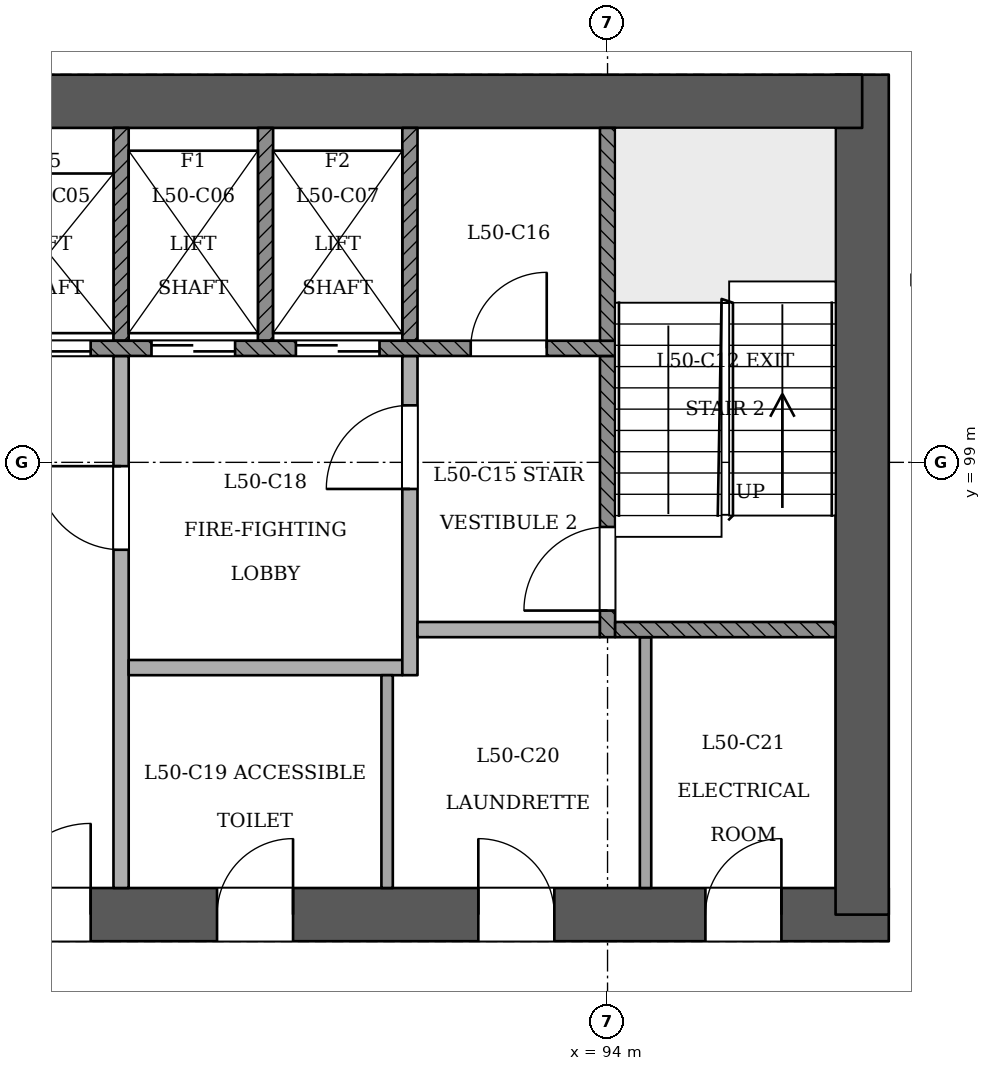
"""IFC4 building model, lengths in metres.
Left out: names, types, materials, properties, quantities, classifications, styles, units other than length and angle.
Written with IfcOpenShell. Run it as: python <this file> out.ifc"""

import sys

from ifc_helpers import new_model, si_unit, direction, frame, frame_2d, origin, place, context, subcontext, project, spatial, rectangle, extrude, element, fill, save


model = new_model("IFC4")
c1 = context("Model", 3, precision=1e-05, world=origin(), true_north=direction((0.0, 1.0)))
c2 = subcontext(c1, "Body", "Model", "MODEL_VIEW")
j1 = project(units=[si_unit("LENGTHUNIT", "METRE"), si_unit("PLANEANGLEUNIT", "RADIAN")], contexts=[c1])
p1 = place(None, origin())
s1 = spatial("IfcSite", under=j1, at=p1, CompositionType="ELEMENT")
p2 = place(p1, origin())
s2 = spatial("IfcBuilding", under=s1, at=p2, CompositionType="ELEMENT")
p3 = place(p2, frame((0.0, 0.0, 194.4)))
s3 = spatial("IfcBuildingStorey", under=s2, at=p3, CompositionType="ELEMENT", Elevation=194.4)
p4 = place(p3, frame((72.65, 93.05, 0.0), z_axis=(0.0, 0.0, 1.0), x_axis=(1.0, 0.0, 0.0)))
e1 = element("IfcWall", 1, at=p4, inside=s3, PredefinedType="SHEAR", context=c2, shape_type="SweptSolid", body=[
    extrude(rectangle(XDim=25.05, YDim=0.7, at=frame_2d((12.525, 0.0))), origin(), (0.0, 0.0, 1.0), 3.6),
])
p5 = place(p4, frame((1.15, 0.0, 0.0)))
e2 = element("IfcOpeningElement", 2, at=p5, cuts=e1, PredefinedType="OPENING", context=c2, shape_type="SweptSolid", body=[
    extrude(rectangle(XDim=1.2, YDim=2.1, at=frame_2d((0.6, 1.05))), frame((0.0, 0.36, 0.0), z_axis=(0.0, -1.0, 0.0), x_axis=(1.0, 0.0, 0.0)), (0.0, 0.0, 1.0), 0.721),
])
p6 = place(p4, frame((3.35, 0.0, 0.0)))
e3 = element("IfcOpeningElement", 3, at=p6, cuts=e1, PredefinedType="OPENING", context=c2, shape_type="SweptSolid", body=[
    extrude(rectangle(XDim=1.2, YDim=2.1, at=frame_2d((0.6, 1.05))), frame((0.0, 0.36, 0.0), z_axis=(0.0, -1.0, 0.0), x_axis=(1.0, 0.0, 0.0)), (0.0, 0.0, 1.0), 0.721),
])
p7 = place(p4, frame((13.35, 0.0, 0.0)))
e4 = element("IfcOpeningElement", 4, at=p7, cuts=e1, PredefinedType="OPENING", context=c2, shape_type="SweptSolid", body=[
    extrude(rectangle(XDim=1.2, YDim=2.1, at=frame_2d((0.6, 1.05))), frame((0.0, 0.36, 0.0), z_axis=(0.0, -1.0, 0.0), x_axis=(1.0, 0.0, 0.0)), (0.0, 0.0, 1.0), 0.721),
])
p8 = place(p4, frame((16.212, 0.0, 0.0)))
e5 = element("IfcOpeningElement", 5, at=p8, cuts=e1, PredefinedType="OPENING", context=c2, shape_type="SweptSolid", body=[
    extrude(rectangle(XDim=1.0, YDim=2.1, at=frame_2d((0.5, 1.05))), frame((0.0, 0.36, 0.0), z_axis=(0.0, -1.0, 0.0), x_axis=(1.0, 0.0, 0.0)), (0.0, 0.0, 1.0), 0.721),
])
p9 = place(p4, frame((19.65, 0.0, 0.0)))
e6 = element("IfcOpeningElement", 6, at=p9, cuts=e1, PredefinedType="OPENING", context=c2, shape_type="SweptSolid", body=[
    extrude(rectangle(XDim=1.0, YDim=2.1, at=frame_2d((0.5, 1.05))), frame((0.0, 0.36, 0.0), z_axis=(0.0, -1.0, 0.0), x_axis=(1.0, 0.0, 0.0)), (0.0, 0.0, 1.0), 0.721),
])
p10 = place(p4, frame((22.637, 0.0, 0.0)))
e7 = element("IfcOpeningElement", 7, at=p10, cuts=e1, PredefinedType="OPENING", context=c2, shape_type="SweptSolid", body=[
    extrude(rectangle(XDim=1.0, YDim=2.1, at=frame_2d((0.5, 1.05))), frame((0.0, 0.36, 0.0), z_axis=(0.0, -1.0, 0.0), x_axis=(1.0, 0.0, 0.0)), (0.0, 0.0, 1.0), 0.721),
])
p11 = place(p3, frame((97.35, 93.05, 0.0), z_axis=(0.0, 0.0, 1.0), x_axis=(0.0, 1.0, 0.0)))
e8 = element("IfcWall", 8, at=p11, inside=s3, PredefinedType="SHEAR", context=c2, shape_type="SweptSolid", body=[
    extrude(rectangle(XDim=11.05, YDim=0.7, at=frame_2d((5.525, 0.0))), origin(), (0.0, 0.0, 1.0), 3.6),
])
p12 = place(p3, frame((97.35, 103.75, 0.0), z_axis=(0.0, 0.0, 1.0), x_axis=(-1.0, 0.0, 0.0)))
e9 = element("IfcWall", 9, at=p12, inside=s3, PredefinedType="SHEAR", context=c2, shape_type="SweptSolid", body=[
    extrude(rectangle(XDim=25.05, YDim=0.7, at=frame_2d((12.525, 0.0))), origin(), (0.0, 0.0, 1.0), 3.6),
])
p13 = place(p3, frame((87.6, 93.4, 0.0), z_axis=(0.0, 0.0, 1.0), x_axis=(0.0, 1.0, 0.0)))
e10 = element("IfcWall", 10, at=p13, inside=s3, PredefinedType="PARTITIONING", context=c2, shape_type="SweptSolid", body=[
    extrude(rectangle(XDim=7.0, YDim=0.2, at=frame_2d((3.5, 0.0))), origin(), (0.0, 0.0, 1.0), 3.15),
])
p14 = place(p13, frame((4.45, 0.0, 0.0)))
e11 = element("IfcOpeningElement", 11, at=p14, cuts=e10, PredefinedType="OPENING", context=c2, shape_type="SweptSolid", body=[
    extrude(rectangle(XDim=1.1, YDim=2.1, at=frame_2d((0.55, 1.05))), frame((0.0, 0.11, 0.0), z_axis=(0.0, -1.0, 0.0), x_axis=(1.0, 0.0, 0.0)), (0.0, 0.0, 1.0), 0.221),
])
p15 = place(p3, frame((91.1, 93.4, 0.0), z_axis=(0.0, 0.0, 1.0), x_axis=(0.0, 1.0, 0.0)))
e12 = element("IfcWall", 12, at=p15, inside=s3, PredefinedType="PARTITIONING", context=c2, shape_type="SweptSolid", body=[
    extrude(rectangle(XDim=2.8, YDim=0.15, at=frame_2d((1.4, 0.0))), origin(), (0.0, 0.0, 1.0), 3.15),
])
p16 = place(p3, frame((94.5, 93.4, 0.0), z_axis=(0.0, 0.0, 1.0), x_axis=(0.0, 1.0, 0.0)))
e13 = element("IfcWall", 13, at=p16, inside=s3, PredefinedType="PARTITIONING", context=c2, shape_type="SweptSolid", body=[
    extrude(rectangle(XDim=3.3, YDim=0.15, at=frame_2d((1.65, 0.0))), origin(), (0.0, 0.0, 1.0), 3.15),
])
p17 = place(p3, frame((87.7, 96.3, 0.0), z_axis=(0.0, 0.0, 1.0), x_axis=(1.0, 0.0, 0.0)))
e14 = element("IfcWall", 14, at=p17, inside=s3, PredefinedType="PARTITIONING", context=c2, shape_type="SweptSolid", body=[
    extrude(rectangle(XDim=3.6, YDim=0.2, at=frame_2d((1.8, 0.0))), origin(), (0.0, 0.0, 1.0), 3.15),
])
p18 = place(p3, frame((91.4, 96.2, 0.0), z_axis=(0.0, 0.0, 1.0), x_axis=(0.0, 1.0, 0.0)))
e15 = element("IfcWall", 15, at=p18, inside=s3, PredefinedType="PARTITIONING", context=c2, shape_type="SweptSolid", body=[
    extrude(rectangle(XDim=4.2, YDim=0.2, at=frame_2d((2.1, 0.0))), origin(), (0.0, 0.0, 1.0), 3.15),
])
p19 = place(p18, frame((2.45, 0.0, 0.0)))
e16 = element("IfcOpeningElement", 16, at=p19, cuts=e15, PredefinedType="OPENING", context=c2, shape_type="SweptSolid", body=[
    extrude(rectangle(XDim=1.1, YDim=2.1, at=frame_2d((0.55, 1.05))), frame((0.0, 0.11, 0.0), z_axis=(0.0, -1.0, 0.0), x_axis=(1.0, 0.0, 0.0)), (0.0, 0.0, 1.0), 0.221),
])
p20 = place(p3, frame((91.5, 96.8, 0.0), z_axis=(0.0, 0.0, 1.0), x_axis=(1.0, 0.0, 0.0)))
e17 = element("IfcWall", 17, at=p20, inside=s3, PredefinedType="PARTITIONING", context=c2, shape_type="SweptSolid", body=[
    extrude(rectangle(XDim=2.4, YDim=0.2, at=frame_2d((1.2, 0.0))), origin(), (0.0, 0.0, 1.0), 3.15),
])
p21 = place(p3, frame((94.0, 96.7, 0.0), z_axis=(0.0, 0.0, 1.0), x_axis=(0.0, 1.0, 0.0)))
e18 = element("IfcWall", 18, at=p21, inside=s3, PredefinedType="SOLIDWALL", context=c2, shape_type="SweptSolid", body=[
    extrude(rectangle(XDim=3.7, YDim=0.2, at=frame_2d((1.85, 0.0))), origin(), (0.0, 0.0, 1.0), 3.15),
])
p22 = place(p21, frame((0.35, 0.0, 0.0)))
e19 = element("IfcOpeningElement", 19, at=p22, cuts=e18, PredefinedType="OPENING", context=c2, shape_type="SweptSolid", body=[
    extrude(rectangle(XDim=1.1, YDim=2.1, at=frame_2d((0.55, 1.05))), frame((0.0, 0.11, 0.0), z_axis=(0.0, -1.0, 0.0), x_axis=(1.0, 0.0, 0.0)), (0.0, 0.0, 1.0), 0.221),
])
p23 = place(p3, frame((94.1, 96.8, 0.0), z_axis=(0.0, 0.0, 1.0), x_axis=(1.0, 0.0, 0.0)))
e20 = element("IfcWall", 20, at=p23, inside=s3, PredefinedType="SOLIDWALL", context=c2, shape_type="SweptSolid", body=[
    extrude(rectangle(XDim=2.9, YDim=0.2, at=frame_2d((1.45, 0.0))), origin(), (0.0, 0.0, 1.0), 3.15),
])
p24 = place(p3, frame((75.9, 100.5, 0.0), z_axis=(0.0, 0.0, 1.0), x_axis=(1.0, 0.0, 0.0)))
e21 = element("IfcWall", 21, at=p24, inside=s3, PredefinedType="SOLIDWALL", context=c2, shape_type="SweptSolid", body=[
    extrude(rectangle(XDim=18.2, YDim=0.2, at=frame_2d((9.1, 0.0))), origin(), (0.0, 0.0, 1.0), 3.15),
])
p25 = place(p24, frame((2.6, 0.0, 0.0)))
e22 = element("IfcOpeningElement", 22, at=p25, cuts=e21, PredefinedType="OPENING", context=c2, shape_type="SweptSolid", body=[
    extrude(rectangle(XDim=1.1, YDim=2.1, at=frame_2d((0.55, 1.05))), frame((0.0, 0.11, 0.0), z_axis=(0.0, -1.0, 0.0), x_axis=(1.0, 0.0, 0.0)), (0.0, 0.0, 1.0), 0.221),
])
p26 = place(p24, frame((4.5, 0.0, 0.0)))
e23 = element("IfcOpeningElement", 23, at=p26, cuts=e21, PredefinedType="OPENING", context=c2, shape_type="SweptSolid", body=[
    extrude(rectangle(XDim=1.1, YDim=2.1, at=frame_2d((0.55, 1.05))), frame((0.0, 0.11, 0.0), z_axis=(0.0, -1.0, 0.0), x_axis=(1.0, 0.0, 0.0)), (0.0, 0.0, 1.0), 0.221),
])
p27 = place(p24, frame((6.4, 0.0, 0.0)))
e24 = element("IfcOpeningElement", 24, at=p27, cuts=e21, PredefinedType="OPENING", context=c2, shape_type="SweptSolid", body=[
    extrude(rectangle(XDim=1.1, YDim=2.1, at=frame_2d((0.55, 1.05))), frame((0.0, 0.11, 0.0), z_axis=(0.0, -1.0, 0.0), x_axis=(1.0, 0.0, 0.0)), (0.0, 0.0, 1.0), 0.221),
])
p28 = place(p24, frame((8.3, 0.0, 0.0)))
e25 = element("IfcOpeningElement", 25, at=p28, cuts=e21, PredefinedType="OPENING", context=c2, shape_type="SweptSolid", body=[
    extrude(rectangle(XDim=1.1, YDim=2.1, at=frame_2d((0.55, 1.05))), frame((0.0, 0.11, 0.0), z_axis=(0.0, -1.0, 0.0), x_axis=(1.0, 0.0, 0.0)), (0.0, 0.0, 1.0), 0.221),
])
p29 = place(p24, frame((10.2, 0.0, 0.0)))
e26 = element("IfcOpeningElement", 26, at=p29, cuts=e21, PredefinedType="OPENING", context=c2, shape_type="SweptSolid", body=[
    extrude(rectangle(XDim=1.1, YDim=2.1, at=frame_2d((0.55, 1.05))), frame((0.0, 0.11, 0.0), z_axis=(0.0, -1.0, 0.0), x_axis=(1.0, 0.0, 0.0)), (0.0, 0.0, 1.0), 0.221),
])
p30 = place(p24, frame((12.1, 0.0, 0.0)))
e27 = element("IfcOpeningElement", 27, at=p30, cuts=e21, PredefinedType="OPENING", context=c2, shape_type="SweptSolid", body=[
    extrude(rectangle(XDim=1.1, YDim=2.1, at=frame_2d((0.55, 1.05))), frame((0.0, 0.11, 0.0), z_axis=(0.0, -1.0, 0.0), x_axis=(1.0, 0.0, 0.0)), (0.0, 0.0, 1.0), 0.221),
])
p31 = place(p24, frame((14.0, 0.0, 0.0)))
e28 = element("IfcOpeningElement", 28, at=p31, cuts=e21, PredefinedType="OPENING", context=c2, shape_type="SweptSolid", body=[
    extrude(rectangle(XDim=1.1, YDim=2.1, at=frame_2d((0.55, 1.05))), frame((0.0, 0.11, 0.0), z_axis=(0.0, -1.0, 0.0), x_axis=(1.0, 0.0, 0.0)), (0.0, 0.0, 1.0), 0.221),
])
p32 = place(p24, frame((0.65, 0.0, 0.0)))
e29 = element("IfcOpeningElement", 29, at=p32, cuts=e21, PredefinedType="OPENING", context=c2, shape_type="SweptSolid", body=[
    extrude(rectangle(XDim=1.0, YDim=2.1, at=frame_2d((0.5, 1.05))), frame((0.0, 0.11, 0.0), z_axis=(0.0, -1.0, 0.0), x_axis=(1.0, 0.0, 0.0)), (0.0, 0.0, 1.0), 0.221),
])
p33 = place(p24, frame((16.3, 0.0, 0.0)))
e30 = element("IfcOpeningElement", 30, at=p33, cuts=e21, PredefinedType="OPENING", context=c2, shape_type="SweptSolid", body=[
    extrude(rectangle(XDim=1.0, YDim=2.1, at=frame_2d((0.5, 1.05))), frame((0.0, 0.11, 0.0), z_axis=(0.0, -1.0, 0.0), x_axis=(1.0, 0.0, 0.0)), (0.0, 0.0, 1.0), 0.221),
])
for number, where, z_axis, x_axis in (
    (31, (87.6, 100.6, 0.0), (0.0, 0.0, 1.0), (0.0, 1.0, 0.0)),
    (32, (89.5, 100.6, 0.0), (0.0, 0.0, 1.0), (0.0, 1.0, 0.0)),
    (33, (91.4, 100.6, 0.0), (0.0, 0.0, 1.0), (0.0, 1.0, 0.0)),
    (34, (94.0, 100.6, 0.0), (0.0, 0.0, 1.0), (0.0, 1.0, 0.0)),
):
    element("IfcWall", number, at=place(p3, frame(where, z_axis=z_axis, x_axis=x_axis)), inside=s3, PredefinedType="SOLIDWALL", context=c2, shape_type="SweptSolid", body=[
        extrude(rectangle(XDim=2.8, YDim=0.2, at=frame_2d((1.4, 0.0))), origin(), (0.0, 0.0, 1.0), 3.15),
    ])
p34 = place(p29, origin())
e35 = element("IfcDoor", 35, at=p34, inside=s3, OperationType="SLIDING_TO_RIGHT", PredefinedType="NOTDEFINED", context=c2, shape_type="SweptSolid", body=[
    extrude(rectangle(XDim=1.1, YDim=2.1, at=frame_2d((0.55, 1.05))), frame((0.0, 0.025, 0.0), z_axis=(0.0, -1.0, 0.0), x_axis=(1.0, 0.0, 0.0)), (0.0, 0.0, 1.0), 0.05),
])
fill(e26, e35)
p35 = place(p30, origin())
e36 = element("IfcDoor", 36, at=p35, inside=s3, OperationType="SLIDING_TO_RIGHT", PredefinedType="NOTDEFINED", context=c2, shape_type="SweptSolid", body=[
    extrude(rectangle(XDim=1.1, YDim=2.1, at=frame_2d((0.55, 1.05))), frame((0.0, 0.025, 0.0), z_axis=(0.0, -1.0, 0.0), x_axis=(1.0, 0.0, 0.0)), (0.0, 0.0, 1.0), 0.05),
])
fill(e27, e36)
p36 = place(p31, origin())
e37 = element("IfcDoor", 37, at=p36, inside=s3, OperationType="SLIDING_TO_LEFT", PredefinedType="NOTDEFINED", context=c2, shape_type="SweptSolid", body=[
    extrude(rectangle(XDim=1.1, YDim=2.1, at=frame_2d((0.55, 1.05))), frame((0.0, 0.025, 0.0), z_axis=(0.0, -1.0, 0.0), x_axis=(1.0, 0.0, 0.0)), (0.0, 0.0, 1.0), 0.05),
])
fill(e28, e37)
p37 = place(p22, origin())
e38 = element("IfcDoor", 38, at=p37, inside=s3, OperationType="SINGLE_SWING_LEFT", PredefinedType="NOTDEFINED", context=c2, shape_type="SweptSolid", body=[
    extrude(rectangle(XDim=1.1, YDim=2.1, at=frame_2d((0.55, 1.05))), frame((0.0, 0.025, 0.0), z_axis=(0.0, -1.0, 0.0), x_axis=(1.0, 0.0, 0.0)), (0.0, 0.0, 1.0), 0.05),
])
fill(e19, e38)
p38 = place(p14, origin())
e39 = element("IfcDoor", 39, at=p38, inside=s3, OperationType="SINGLE_SWING_RIGHT", PredefinedType="NOTDEFINED", context=c2, shape_type="SweptSolid", body=[
    extrude(rectangle(XDim=1.1, YDim=2.1, at=frame_2d((0.55, 1.05))), frame((0.0, 0.025, 0.0), z_axis=(0.0, -1.0, 0.0), x_axis=(1.0, 0.0, 0.0)), (0.0, 0.0, 1.0), 0.05),
])
fill(e11, e39)
p39 = place(p19, origin())
e40 = element("IfcDoor", 40, at=p39, inside=s3, OperationType="SINGLE_SWING_LEFT", PredefinedType="NOTDEFINED", context=c2, shape_type="SweptSolid", body=[
    extrude(rectangle(XDim=1.1, YDim=2.1, at=frame_2d((0.55, 1.05))), frame((0.0, 0.025, 0.0), z_axis=(0.0, -1.0, 0.0), x_axis=(1.0, 0.0, 0.0)), (0.0, 0.0, 1.0), 0.05),
])
fill(e16, e40)
p40 = place(p7, origin())
e41 = element("IfcDoor", 41, at=p40, inside=s3, OperationType="SINGLE_SWING_RIGHT", PredefinedType="NOTDEFINED", context=c2, shape_type="SweptSolid", body=[
    extrude(rectangle(XDim=1.2, YDim=2.1, at=frame_2d((0.6, 1.05))), frame((0.0, 0.025, 0.0), z_axis=(0.0, -1.0, 0.0), x_axis=(1.0, 0.0, 0.0)), (0.0, 0.0, 1.0), 0.05),
])
fill(e4, e41)
p41 = place(p33, origin())
e42 = element("IfcDoor", 42, at=p41, inside=s3, OperationType="SINGLE_SWING_RIGHT", PredefinedType="NOTDEFINED", context=c2, shape_type="SweptSolid", body=[
    extrude(rectangle(XDim=1.0, YDim=2.1, at=frame_2d((0.5, 1.05))), frame((0.0, 0.025, 0.0), z_axis=(0.0, -1.0, 0.0), x_axis=(1.0, 0.0, 0.0)), (0.0, 0.0, 1.0), 0.05),
])
fill(e30, e42)
p42 = place(p8, origin())
e43 = element("IfcDoor", 43, at=p42, inside=s3, OperationType="SINGLE_SWING_RIGHT", PredefinedType="NOTDEFINED", context=c2, shape_type="SweptSolid", body=[
    extrude(rectangle(XDim=1.0, YDim=2.1, at=frame_2d((0.5, 1.05))), frame((0.0, 0.025, 0.0), z_axis=(0.0, -1.0, 0.0), x_axis=(1.0, 0.0, 0.0)), (0.0, 0.0, 1.0), 0.05),
])
fill(e5, e43)
p43 = place(p9, origin())
e44 = element("IfcDoor", 44, at=p43, inside=s3, OperationType="SINGLE_SWING_LEFT", PredefinedType="NOTDEFINED", context=c2, shape_type="SweptSolid", body=[
    extrude(rectangle(XDim=1.0, YDim=2.1, at=frame_2d((0.5, 1.05))), frame((0.0, 0.025, 0.0), z_axis=(0.0, -1.0, 0.0), x_axis=(1.0, 0.0, 0.0)), (0.0, 0.0, 1.0), 0.05),
])
fill(e6, e44)
p44 = place(p10, origin())
e45 = element("IfcDoor", 45, at=p44, inside=s3, OperationType="SINGLE_SWING_RIGHT", PredefinedType="NOTDEFINED", context=c2, shape_type="SweptSolid", body=[
    extrude(rectangle(XDim=1.0, YDim=2.1, at=frame_2d((0.5, 1.05))), frame((0.0, 0.025, 0.0), z_axis=(0.0, -1.0, 0.0), x_axis=(1.0, 0.0, 0.0)), (0.0, 0.0, 1.0), 0.05),
])
fill(e7, e45)
save(model, sys.argv[1])
